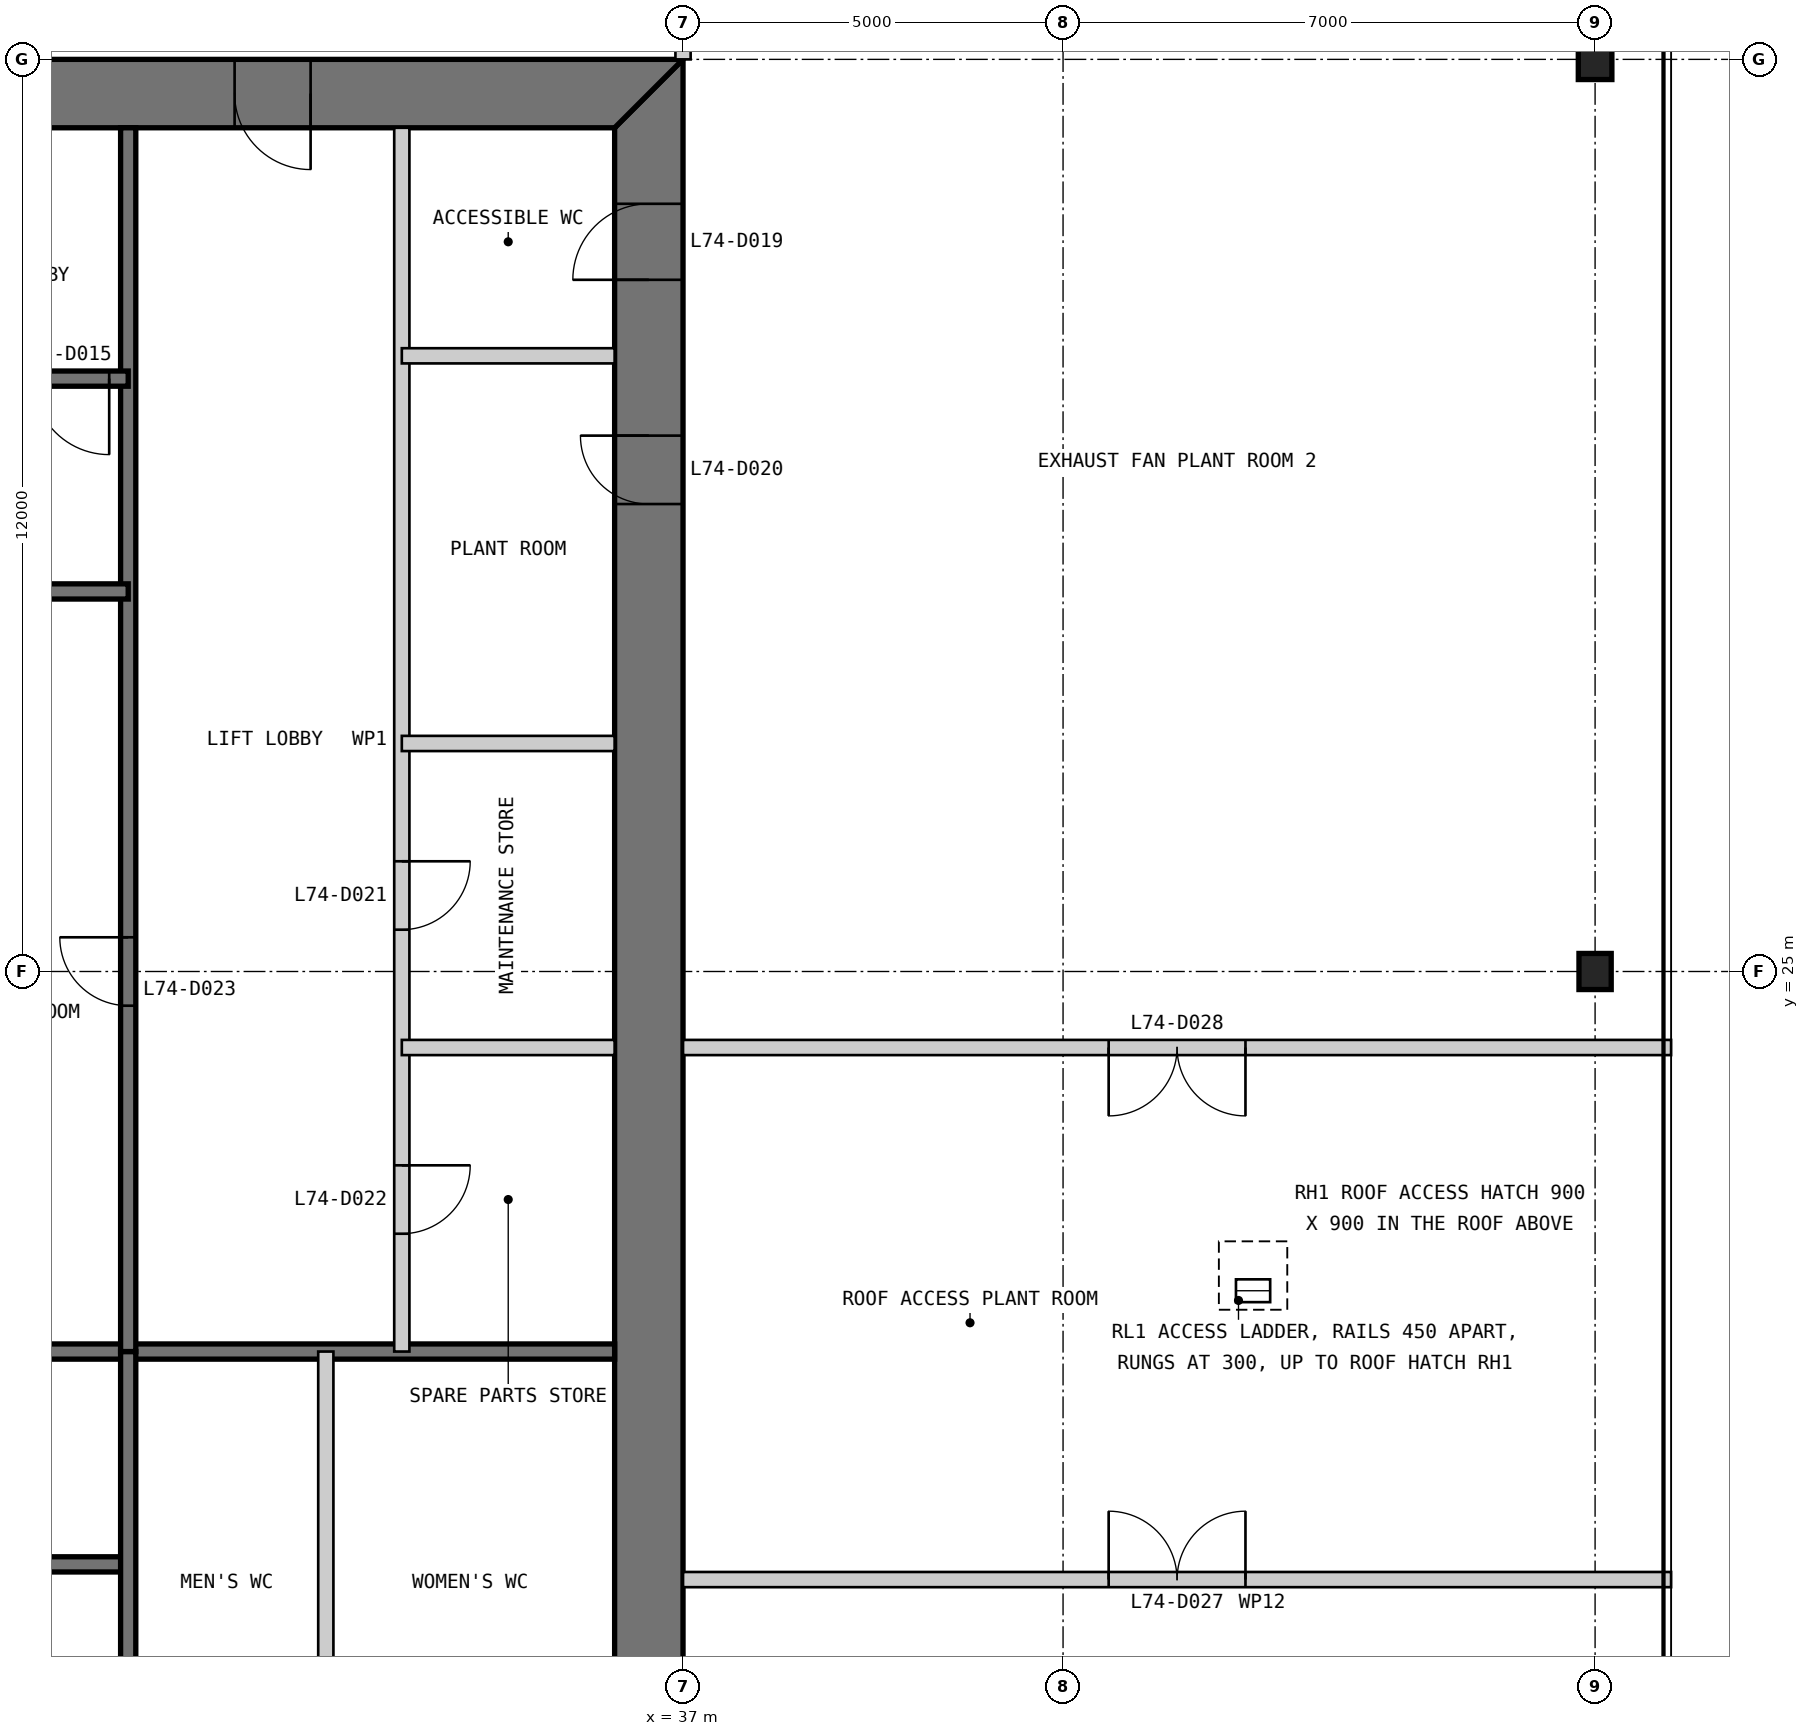
"""IFC4 building model, lengths in metres.
Left out: names, types, materials, properties, quantities, classifications, styles, units other than length and angle.
Written with IfcOpenShell. Run it as: python <this file> out.ifc"""

import sys

from ifc_helpers import new_model, si_unit, direction, frame, frame_2d, origin, origin_2d, place, context, subcontext, project, spatial, polyline, rectangle, i_section, outline, extrude, element, fill, save


model = new_model("IFC4")
c1 = context("Model", 3, precision=1e-05, world=origin(), true_north=direction((0.0, 1.0)))
c2 = subcontext(c1, "Body", "Model", "MODEL_VIEW")
j1 = project(units=[si_unit("LENGTHUNIT", "METRE"), si_unit("PLANEANGLEUNIT", "RADIAN")], contexts=[c1])
p1 = place(None, origin())
s1 = spatial("IfcSite", under=j1, at=p1, CompositionType="ELEMENT")
p2 = place(p1, origin())
s2 = spatial("IfcBuilding", under=s1, at=p2, CompositionType="ELEMENT")
p3 = place(p2, frame((0.0, 0.0, 307.8)))
s3 = spatial("IfcBuildingStorey", under=s2, at=p3, CompositionType="ELEMENT", Elevation=307.8)
p4 = place(p3, frame((49.0, 25.0, 0.0), z_axis=(0.0, 0.0, 1.0), x_axis=(1.0, 0.0, 0.0)))
e1 = element("IfcColumn", 1, at=p4, inside=s3, PredefinedType="COLUMN", context=c2, shape_type="SweptSolid", body=[
    extrude(i_section(OverallWidth=0.424, OverallDepth=0.475, WebThickness=0.048, FlangeThickness=0.077, at=origin_2d()), origin(), (0.0, 0.0, 1.0), 5.75),
])
p5 = place(p3, frame((49.0, 37.0, 0.0), z_axis=(0.0, 0.0, 1.0), x_axis=(1.0, 0.0, 0.0)))
e2 = element("IfcColumn", 2, at=p5, inside=s3, PredefinedType="COLUMN", context=c2, shape_type="SweptSolid", body=[
    extrude(i_section(OverallWidth=0.442, OverallDepth=0.531, WebThickness=0.066, FlangeThickness=0.106, at=origin_2d()), origin(), (0.0, 0.0, 1.0), 5.75),
])
p6 = place(p3, frame((36.55, 13.9, 0.0), z_axis=(0.0, 0.0, 1.0), x_axis=(0.0, 1.0, 0.0)))
e3 = element("IfcWall", 3, at=p6, inside=s3, PredefinedType="SHEAR", context=c2, shape_type="SweptSolid", body=[
    extrude(outline(polyline([(-0.9, -0.45), (23.1, -0.45), (22.2, 0.45), (0.0, 0.45), (-0.9, -0.45)])), origin(), (0.0, 0.0, 1.0), 5.75),
])
p7 = place(p6, frame((20.2, 0.0, 0.0)))
e4 = element("IfcOpeningElement", 4, at=p7, cuts=e3, PredefinedType="OPENING", context=c2, shape_type="SweptSolid", body=[
    extrude(rectangle(XDim=1.0, YDim=2.2, at=frame_2d((0.5, 1.1))), frame((0.0, 0.46, 0.0), z_axis=(0.0, -1.0, 0.0), x_axis=(1.0, 0.0, 0.0)), (0.0, 0.0, 1.0), 0.92),
])
p8 = place(p6, frame((17.25, 0.0, 0.0)))
e5 = element("IfcOpeningElement", 5, at=p8, cuts=e3, PredefinedType="OPENING", context=c2, shape_type="SweptSolid", body=[
    extrude(rectangle(XDim=0.9, YDim=2.2, at=frame_2d((0.45, 1.1))), frame((0.0, 0.46, 0.0), z_axis=(0.0, -1.0, 0.0), x_axis=(1.0, 0.0, 0.0)), (0.0, 0.0, 1.0), 0.92),
])
p9 = place(p3, frame((37.0, 36.55, 0.0), z_axis=(0.0, 0.0, 1.0), x_axis=(-1.0, 0.0, 0.0)))
e6 = element("IfcWall", 6, at=p9, inside=s3, PredefinedType="SHEAR", context=c2, shape_type="SweptSolid", body=[
    extrude(outline(polyline([(0.0, -0.45), (24.0, -0.45), (23.1, 0.45), (0.9, 0.45), (0.0, -0.45)])), origin(), (0.0, 0.0, 1.0), 5.75),
])
p10 = place(p9, frame((4.9, 0.0, 0.0)))
e7 = element("IfcOpeningElement", 7, at=p10, cuts=e6, PredefinedType="OPENING", context=c2, shape_type="SweptSolid", body=[
    extrude(rectangle(XDim=1.0, YDim=2.2, at=frame_2d((0.5, 1.1))), frame((0.0, 0.46, 0.0), z_axis=(0.0, -1.0, 0.0), x_axis=(1.0, 0.0, 0.0)), (0.0, 0.0, 1.0), 0.92),
])
p11 = place(p9, frame((8.9, 0.0, 0.0)))
e8 = element("IfcOpeningElement", 8, at=p11, cuts=e6, PredefinedType="OPENING", context=c2, shape_type="SweptSolid", body=[
    extrude(rectangle(XDim=1.1, YDim=2.2, at=frame_2d((0.55, 1.1))), frame((0.0, 0.46, 0.0), z_axis=(0.0, -1.0, 0.0), x_axis=(1.0, 0.0, 0.0)), (0.0, 0.0, 1.0), 0.92),
])
p12 = place(p9, frame((15.05, 0.0, 0.0)))
e9 = element("IfcOpeningElement", 9, at=p12, cuts=e6, PredefinedType="OPENING", context=c2, shape_type="SweptSolid", body=[
    extrude(rectangle(XDim=0.9, YDim=2.2, at=frame_2d((0.45, 1.1))), frame((0.0, 0.46, 0.0), z_axis=(0.0, -1.0, 0.0), x_axis=(1.0, 0.0, 0.0)), (0.0, 0.0, 1.0), 0.92),
])
p13 = place(p9, frame((17.9, 0.0, 0.0)))
e10 = element("IfcOpeningElement", 10, at=p13, cuts=e6, PredefinedType="OPENING", context=c2, shape_type="SweptSolid", body=[
    extrude(rectangle(XDim=1.0, YDim=2.2, at=frame_2d((0.5, 1.1))), frame((0.0, 0.46, 0.0), z_axis=(0.0, -1.0, 0.0), x_axis=(1.0, 0.0, 0.0)), (0.0, 0.0, 1.0), 0.92),
])
p14 = place(p9, frame((21.4, 0.0, 0.0)))
e11 = element("IfcOpeningElement", 11, at=p14, cuts=e6, PredefinedType="OPENING", context=c2, shape_type="SweptSolid", body=[
    extrude(rectangle(XDim=1.0, YDim=2.2, at=frame_2d((0.5, 1.1))), frame((0.0, 0.46, 0.0), z_axis=(0.0, -1.0, 0.0), x_axis=(1.0, 0.0, 0.0)), (0.0, 0.0, 1.0), 0.92),
])
p15 = place(p3, frame((20.3, 17.2, 0.0), z_axis=(0.0, 0.0, 1.0), x_axis=(1.0, 0.0, 0.0)))
e12 = element("IfcWall", 12, at=p15, inside=s3, PredefinedType="SOLIDWALL", context=c2, shape_type="SweptSolid", body=[
    extrude(rectangle(XDim=9.4, YDim=0.2, at=frame_2d((4.7, 0.0))), origin(), (0.0, 0.0, 1.0), 5.75),
])
p16 = place(p15, frame((0.25, 0.0, 0.0)))
e13 = element("IfcOpeningElement", 13, at=p16, cuts=e12, PredefinedType="OPENING", context=c2, shape_type="SweptSolid", body=[
    extrude(rectangle(XDim=1.0, YDim=2.2, at=frame_2d((0.5, 1.1))), frame((0.0, 0.11, 0.0), z_axis=(0.0, -1.0, 0.0), x_axis=(1.0, 0.0, 0.0)), (0.0, 0.0, 1.0), 0.22),
])
p17 = place(p3, frame((20.3, 20.0, 0.0), z_axis=(0.0, 0.0, 1.0), x_axis=(1.0, 0.0, 0.0)))
e14 = element("IfcWall", 14, at=p17, inside=s3, PredefinedType="SOLIDWALL", context=c2, shape_type="SweptSolid", body=[
    extrude(rectangle(XDim=15.8, YDim=0.2, at=frame_2d((7.9, 0.0))), origin(), (0.0, 0.0, 1.0), 5.75),
])
p18 = place(p3, frame((29.7, 13.9, 0.0), z_axis=(0.0, 0.0, 1.0), x_axis=(0.0, 1.0, 0.0)))
e15 = element("IfcWall", 15, at=p18, inside=s3, PredefinedType="SOLIDWALL", context=c2, shape_type="SweptSolid", body=[
    extrude(rectangle(XDim=6.1, YDim=0.2, at=frame_2d((3.05, 0.0))), origin(), (0.0, 0.0, 1.0), 5.75),
])
p19 = place(p3, frame((32.3, 13.9, 0.0), z_axis=(0.0, 0.0, 1.0), x_axis=(0.0, 1.0, 0.0)))
e16 = element("IfcWall", 16, at=p19, inside=s3, PredefinedType="PARTITIONING", context=c2, shape_type="SweptSolid", body=[
    extrude(rectangle(XDim=6.1, YDim=0.2, at=frame_2d((3.05, 0.0))), origin(), (0.0, 0.0, 1.0), 5.75),
])
p20 = place(p3, frame((33.3, 36.1, 0.0), z_axis=(0.0, 0.0, 1.0), x_axis=(0.0, -1.0, 0.0)))
e17 = element("IfcWall", 17, at=p20, inside=s3, PredefinedType="PARTITIONING", context=c2, shape_type="SweptSolid", body=[
    extrude(rectangle(XDim=16.1, YDim=0.2, at=frame_2d((8.05, 0.0))), origin(), (0.0, 0.0, 1.0), 5.75),
])
p21 = place(p20, frame((9.65, 0.0, 0.0)))
e18 = element("IfcOpeningElement", 18, at=p21, cuts=e17, PredefinedType="OPENING", context=c2, shape_type="SweptSolid", body=[
    extrude(rectangle(XDim=0.9, YDim=2.2, at=frame_2d((0.45, 1.1))), frame((0.0, 0.11, 0.0), z_axis=(0.0, -1.0, 0.0), x_axis=(1.0, 0.0, 0.0)), (0.0, 0.0, 1.0), 0.22),
])
p22 = place(p20, frame((13.65, 0.0, 0.0)))
e19 = element("IfcOpeningElement", 19, at=p22, cuts=e17, PredefinedType="OPENING", context=c2, shape_type="SweptSolid", body=[
    extrude(rectangle(XDim=0.9, YDim=2.2, at=frame_2d((0.45, 1.1))), frame((0.0, 0.11, 0.0), z_axis=(0.0, -1.0, 0.0), x_axis=(1.0, 0.0, 0.0)), (0.0, 0.0, 1.0), 0.22),
])
p23 = place(p3, frame((29.7, 36.1, 0.0), z_axis=(0.0, 0.0, 1.0), x_axis=(0.0, -1.0, 0.0)))
e20 = element("IfcWall", 20, at=p23, inside=s3, PredefinedType="SOLIDWALL", context=c2, shape_type="SweptSolid", body=[
    extrude(rectangle(XDim=16.1, YDim=0.2, at=frame_2d((8.05, 0.0))), origin(), (0.0, 0.0, 1.0), 5.75),
])
p24 = place(p23, frame((10.65, 0.0, 0.0)))
e21 = element("IfcOpeningElement", 21, at=p24, cuts=e20, PredefinedType="OPENING", context=c2, shape_type="SweptSolid", body=[
    extrude(rectangle(XDim=0.9, YDim=2.2, at=frame_2d((0.45, 1.1))), frame((0.0, 0.11, 0.0), z_axis=(0.0, -1.0, 0.0), x_axis=(1.0, 0.0, 0.0)), (0.0, 0.0, 1.0), 0.22),
])
p25 = place(p3, frame((29.7, 32.8, 0.0), z_axis=(0.0, 0.0, 1.0), x_axis=(-1.0, 0.0, 0.0)))
e22 = element("IfcWall", 22, at=p25, inside=s3, PredefinedType="SOLIDWALL", context=c2, shape_type="SweptSolid", body=[
    extrude(rectangle(XDim=9.4, YDim=0.2, at=frame_2d((4.7, 0.0))), origin(), (0.0, 0.0, 1.0), 5.75),
])
p26 = place(p25, frame((0.25, 0.0, 0.0)))
e23 = element("IfcOpeningElement", 23, at=p26, cuts=e22, PredefinedType="OPENING", context=c2, shape_type="SweptSolid", body=[
    extrude(rectangle(XDim=1.0, YDim=2.2, at=frame_2d((0.5, 1.1))), frame((0.0, 0.11, 0.0), z_axis=(0.0, -1.0, 0.0), x_axis=(1.0, 0.0, 0.0)), (0.0, 0.0, 1.0), 0.22),
])
p27 = place(p3, frame((29.7, 30.0, 0.0), z_axis=(0.0, 0.0, 1.0), x_axis=(-1.0, 0.0, 0.0)))
e24 = element("IfcWall", 24, at=p27, inside=s3, PredefinedType="SOLIDWALL", context=c2, shape_type="SweptSolid", body=[
    extrude(rectangle(XDim=15.8, YDim=0.2, at=frame_2d((7.9, 0.0))), origin(), (0.0, 0.0, 1.0), 5.75),
])
for number, where, z_axis, x_axis in (
    (25, (36.1, 33.1, 0.0), (0.0, 0.0, 1.0), (-1.0, 0.0, 0.0)),
    (26, (36.1, 28.0, 0.0), (0.0, 0.0, 1.0), (-1.0, 0.0, 0.0)),
    (27, (36.1, 24.0, 0.0), (0.0, 0.0, 1.0), (-1.0, 0.0, 0.0)),
):
    element("IfcWall", number, at=place(p3, frame(where, z_axis=z_axis, x_axis=x_axis)), inside=s3, PredefinedType="PARTITIONING", context=c2, shape_type="SweptSolid", body=[
        extrude(rectangle(XDim=2.8, YDim=0.2, at=frame_2d((1.4, 0.0))), origin(), (0.0, 0.0, 1.0), 5.75),
    ])
p28 = place(p3, frame((37.0, 37.0, 0.0), z_axis=(0.0, 0.0, 1.0), x_axis=(0.0, 1.0, 0.0)))
e28 = element("IfcWall", 28, at=p28, inside=s3, PredefinedType="PARTITIONING", context=c2, shape_type="SweptSolid", body=[
    extrude(rectangle(XDim=2.4, YDim=0.2, at=frame_2d((1.2, 0.0))), origin(), (0.0, 0.0, 1.0), 4.802),
])
p29 = place(p3, frame((37.0, 17.0, 0.0), z_axis=(0.0, 0.0, 1.0), x_axis=(1.0, 0.0, 0.0)))
e29 = element("IfcWall", 29, at=p29, inside=s3, PredefinedType="PARTITIONING", context=c2, shape_type="SweptSolid", body=[
    extrude(rectangle(XDim=13.0, YDim=0.2, at=frame_2d((6.5, 0.0))), origin(), (0.0, 0.0, 1.0), 5.75),
])
p30 = place(p29, frame((5.6, 0.0, 0.0)))
e30 = element("IfcOpeningElement", 30, at=p30, cuts=e29, PredefinedType="OPENING", context=c2, shape_type="SweptSolid", body=[
    extrude(rectangle(XDim=1.8, YDim=2.4, at=frame_2d((0.9, 1.2))), frame((0.0, 0.11, 0.0), z_axis=(0.0, -1.0, 0.0), x_axis=(1.0, 0.0, 0.0)), (0.0, 0.0, 1.0), 0.22),
])
p31 = place(p3, frame((37.0, 24.0, 0.0), z_axis=(0.0, 0.0, 1.0), x_axis=(1.0, 0.0, 0.0)))
e31 = element("IfcWall", 31, at=p31, inside=s3, PredefinedType="PARTITIONING", context=c2, shape_type="SweptSolid", body=[
    extrude(rectangle(XDim=13.0, YDim=0.2, at=frame_2d((6.5, 0.0))), origin(), (0.0, 0.0, 1.0), 5.75),
])
p32 = place(p31, frame((5.6, 0.0, 0.0)))
e32 = element("IfcOpeningElement", 32, at=p32, cuts=e31, PredefinedType="OPENING", context=c2, shape_type="SweptSolid", body=[
    extrude(rectangle(XDim=1.8, YDim=2.4, at=frame_2d((0.9, 1.2))), frame((0.0, 0.11, 0.0), z_axis=(0.0, -1.0, 0.0), x_axis=(1.0, 0.0, 0.0)), (0.0, 0.0, 1.0), 0.22),
])
p33 = place(p10, origin())
e33 = element("IfcDoor", 33, at=p33, inside=s3, OperationType="SINGLE_SWING_LEFT", PredefinedType="DOOR", context=c2, shape_type="SweptSolid", body=[
    extrude(rectangle(XDim=1.0, YDim=2.2, at=frame_2d((0.5, 1.1))), frame((0.0, 0.025, 0.0), z_axis=(0.0, -1.0, 0.0), x_axis=(1.0, 0.0, 0.0)), (0.0, 0.0, 1.0), 0.05),
    extrude(outline(polyline([(0.0, 0.0), (0.04, 0.0), (0.04, 2.16), (0.96, 2.16), (0.96, 0.0), (1.0, 0.0), (1.0, 2.2), (0.0, 2.2), (0.0, 0.0)])), frame((0.0, 0.3, 0.0), z_axis=(0.0, -1.0, 0.0), x_axis=(1.0, 0.0, 0.0)), (0.0, 0.0, 1.0), 0.6),
])
fill(e7, e33)
p34 = place(p26, origin())
e34 = element("IfcDoor", 34, at=p34, inside=s3, OperationType="SINGLE_SWING_LEFT", PredefinedType="DOOR", context=c2, shape_type="SweptSolid", body=[
    extrude(rectangle(XDim=1.0, YDim=2.2, at=frame_2d((0.5, 1.1))), frame((0.0, 0.025, 0.0), z_axis=(0.0, -1.0, 0.0), x_axis=(1.0, 0.0, 0.0)), (0.0, 0.0, 1.0), 0.05),
])
fill(e23, e34)
p35 = place(p7, origin())
e35 = element("IfcDoor", 35, at=p35, inside=s3, OperationType="SINGLE_SWING_LEFT", PredefinedType="DOOR", context=c2, shape_type="SweptSolid", body=[
    extrude(rectangle(XDim=1.0, YDim=2.2, at=frame_2d((0.5, 1.1))), frame((0.0, 0.025, 0.0), z_axis=(0.0, -1.0, 0.0), x_axis=(1.0, 0.0, 0.0)), (0.0, 0.0, 1.0), 0.05),
    extrude(outline(polyline([(0.0, 0.0), (0.04, 0.0), (0.04, 2.16), (0.96, 2.16), (0.96, 0.0), (1.0, 0.0), (1.0, 2.2), (0.0, 2.2), (0.0, 0.0)])), frame((0.0, 0.3, 0.0), z_axis=(0.0, -1.0, 0.0), x_axis=(1.0, 0.0, 0.0)), (0.0, 0.0, 1.0), 0.6),
])
fill(e4, e35)
p36 = place(p8, origin())
e36 = element("IfcDoor", 36, at=p36, inside=s3, OperationType="SINGLE_SWING_RIGHT", PredefinedType="DOOR", context=c2, shape_type="SweptSolid", body=[
    extrude(rectangle(XDim=0.9, YDim=2.2, at=frame_2d((0.45, 1.1))), frame((0.0, 0.025, 0.0), z_axis=(0.0, -1.0, 0.0), x_axis=(1.0, 0.0, 0.0)), (0.0, 0.0, 1.0), 0.05),
    extrude(outline(polyline([(0.0, 0.0), (0.04, 0.0), (0.04, 2.16), (0.86, 2.16), (0.86, 0.0), (0.9, 0.0), (0.9, 2.2), (0.0, 2.2), (0.0, 0.0)])), frame((0.0, 0.3, 0.0), z_axis=(0.0, -1.0, 0.0), x_axis=(1.0, 0.0, 0.0)), (0.0, 0.0, 1.0), 0.6),
])
fill(e5, e36)
p37 = place(p21, origin())
e37 = element("IfcDoor", 37, at=p37, inside=s3, OperationType="SINGLE_SWING_LEFT", PredefinedType="DOOR", context=c2, shape_type="SweptSolid", body=[
    extrude(rectangle(XDim=0.9, YDim=2.2, at=frame_2d((0.45, 1.1))), frame((0.0, 0.025, 0.0), z_axis=(0.0, -1.0, 0.0), x_axis=(1.0, 0.0, 0.0)), (0.0, 0.0, 1.0), 0.05),
])
fill(e18, e37)
p38 = place(p22, origin())
e38 = element("IfcDoor", 38, at=p38, inside=s3, OperationType="SINGLE_SWING_LEFT", PredefinedType="DOOR", context=c2, shape_type="SweptSolid", body=[
    extrude(rectangle(XDim=0.9, YDim=2.2, at=frame_2d((0.45, 1.1))), frame((0.0, 0.025, 0.0), z_axis=(0.0, -1.0, 0.0), x_axis=(1.0, 0.0, 0.0)), (0.0, 0.0, 1.0), 0.05),
])
fill(e19, e38)
p39 = place(p24, frame((0.9, 0.0, 0.0), z_axis=(0.0, 0.0, 1.0), x_axis=(-1.0, 0.0, 0.0)))
e39 = element("IfcDoor", 39, at=p39, inside=s3, OperationType="SINGLE_SWING_RIGHT", PredefinedType="DOOR", context=c2, shape_type="SweptSolid", body=[
    extrude(rectangle(XDim=0.9, YDim=2.2, at=frame_2d((0.45, 1.1))), frame((0.0, 0.025, 0.0), z_axis=(0.0, -1.0, 0.0), x_axis=(1.0, 0.0, 0.0)), (0.0, 0.0, 1.0), 0.05),
])
fill(e21, e39)
p40 = place(p30, origin())
e40 = element("IfcDoor", 40, at=p40, inside=s3, OperationType="DOUBLE_DOOR_SINGLE_SWING", PredefinedType="DOOR", context=c2, shape_type="SweptSolid", body=[
    extrude(rectangle(XDim=1.8, YDim=2.4, at=frame_2d((0.9, 1.2))), frame((0.0, 0.025, 0.0), z_axis=(0.0, -1.0, 0.0), x_axis=(1.0, 0.0, 0.0)), (0.0, 0.0, 1.0), 0.05),
])
fill(e30, e40)
p41 = place(p32, frame((1.8, 0.0, 0.0), z_axis=(0.0, 0.0, 1.0), x_axis=(-1.0, 0.0, 0.0)))
e41 = element("IfcDoor", 41, at=p41, inside=s3, OperationType="DOUBLE_DOOR_SINGLE_SWING", PredefinedType="DOOR", context=c2, shape_type="SweptSolid", body=[
    extrude(rectangle(XDim=1.8, YDim=2.4, at=frame_2d((0.9, 1.2))), frame((0.0, 0.025, 0.0), z_axis=(0.0, -1.0, 0.0), x_axis=(1.0, 0.0, 0.0)), (0.0, 0.0, 1.0), 0.05),
])
fill(e32, e41)
save(model, sys.argv[1])
